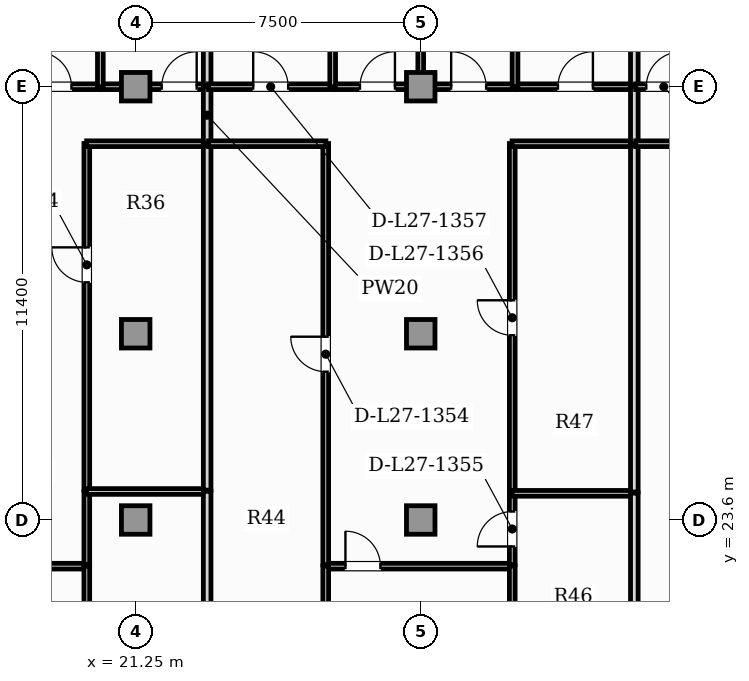
"""IFC4 building model, lengths in metres.
Left out: names, types, materials, properties, quantities, classifications, styles, units other than length and angle.
Written with IfcOpenShell. Run it as: python <this file> out.ifc"""

import sys

from ifc_helpers import new_model, si_unit, direction, frame, frame_2d, origin, origin_2d, place, context, subcontext, project, spatial, rectangle, extrude, element, fill, save


model = new_model("IFC4")
c1 = context("Model", 3, precision=1e-05, world=origin(), true_north=direction((0.0, 1.0)))
c2 = subcontext(c1, "Body", "Model", "MODEL_VIEW")
j1 = project(units=[si_unit("LENGTHUNIT", "METRE"), si_unit("PLANEANGLEUNIT", "RADIAN")], contexts=[c1])
p1 = place(None, origin())
s1 = spatial("IfcSite", under=j1, at=p1, CompositionType="ELEMENT")
p2 = place(p1, origin())
s2 = spatial("IfcBuilding", under=s1, at=p2, CompositionType="ELEMENT")
p3 = place(p2, frame((0.0, 0.0, 111.85)))
s3 = spatial("IfcBuildingStorey", under=s2, at=p3, CompositionType="ELEMENT", Elevation=111.85)
for number, where, z_axis, x_axis in (
    (1, (21.25, 23.6, 0.0), (0.0, 0.0, 1.0), (1.0, 0.0, 0.0)),
    (2, (28.75, 23.6, 0.0), (0.0, 0.0, 1.0), (1.0, 0.0, 0.0)),
    (3, (21.25, 28.5, 0.0), (0.0, 0.0, 1.0), (1.0, 0.0, 0.0)),
    (4, (28.75, 28.5, 0.0), (0.0, 0.0, 1.0), (1.0, 0.0, 0.0)),
    (5, (21.25, 35.0, 0.0), (0.0, 0.0, 1.0), (1.0, 0.0, 0.0)),
    (6, (28.75, 35.0, 0.0), (0.0, 0.0, 1.0), (1.0, 0.0, 0.0)),
):
    element("IfcColumn", number, at=place(p3, frame(where, z_axis=z_axis, x_axis=x_axis)), inside=s3, PredefinedType="COLUMN", context=c2, shape_type="SweptSolid", body=[
        extrude(rectangle(XDim=0.75, YDim=0.75, at=origin_2d()), origin(), (0.0, 0.0, 1.0), 3.85),
    ])
p4 = place(p3, frame((15.051, 22.385, 0.0), z_axis=(0.0, 0.0, 1.0), x_axis=(1.0, 0.0, 0.0)))
e7 = element("IfcWall", 7, at=p4, inside=s3, PredefinedType="PARTITIONING", context=c2, shape_type="SweptSolid", body=[
    extrude(rectangle(XDim=4.917, YDim=0.15, at=frame_2d((2.459, 0.0))), origin(), (0.0, 0.0, 1.0), 3.6),
])
p5 = place(p4, frame((1.999, 0.0, 0.0)))
e8 = element("IfcOpeningElement", 8, at=p5, cuts=e7, PredefinedType="OPENING", context=c2, shape_type="SweptSolid", body=[
    extrude(rectangle(XDim=0.92, YDim=2.1, at=frame_2d((0.46, 1.05))), frame((0.0, 0.085, 0.0), z_axis=(0.0, -1.0, 0.0), x_axis=(1.0, 0.0, 0.0)), (0.0, 0.0, 1.0), 0.17),
])
p6 = place(p3, frame((19.964, 17.2, 0.0), z_axis=(0.0, 0.0, 1.0), x_axis=(0.0, 1.0, 0.0)))
e9 = element("IfcWall", 9, at=p6, inside=s3, PredefinedType="PARTITIONING", context=c2, shape_type="SweptSolid", body=[
    extrude(rectangle(XDim=5.19, YDim=0.15, at=frame_2d((2.595, 0.0))), origin(), (0.0, 0.0, 1.0), 3.6),
])
p7 = place(p6, frame((2.135, 0.0, 0.0)))
e10 = element("IfcOpeningElement", 10, at=p7, cuts=e9, PredefinedType="OPENING", context=c2, shape_type="SweptSolid", body=[
    extrude(rectangle(XDim=0.92, YDim=2.1, at=frame_2d((0.46, 1.05))), frame((0.0, 0.085, 0.0), z_axis=(0.0, -1.0, 0.0), x_axis=(1.0, 0.0, 0.0)), (0.0, 0.0, 1.0), 0.17),
])
p8 = place(p3, frame((19.964, 22.419, 0.0), z_axis=(0.0, 0.0, 1.0), x_axis=(0.0, 1.0, 0.0)))
e11 = element("IfcWall", 11, at=p8, inside=s3, PredefinedType="PARTITIONING", context=c2, shape_type="SweptSolid", body=[
    extrude(rectangle(XDim=1.936, YDim=0.15, at=frame_2d((0.968, 0.0))), origin(), (0.0, 0.0, 1.0), 3.6),
])
p9 = place(p3, frame((19.964, 24.385, 0.0), z_axis=(0.0, 0.0, 1.0), x_axis=(0.0, 1.0, 0.0)))
e12 = element("IfcWall", 12, at=p9, inside=s3, PredefinedType="PARTITIONING", context=c2, shape_type="SweptSolid", body=[
    extrude(rectangle(XDim=9.12, YDim=0.15, at=frame_2d((4.56, 0.0))), origin(), (0.0, 0.0, 1.0), 3.6),
])
p10 = place(p9, frame((5.468, 0.0, 0.0)))
e13 = element("IfcOpeningElement", 13, at=p10, cuts=e12, PredefinedType="OPENING", context=c2, shape_type="SweptSolid", body=[
    extrude(rectangle(XDim=0.92, YDim=2.1, at=frame_2d((0.46, 1.05))), frame((0.0, 0.085, 0.0), z_axis=(0.0, -1.0, 0.0), x_axis=(1.0, 0.0, 0.0)), (0.0, 0.0, 1.0), 0.17),
])
p11 = place(p3, frame((19.959, 33.5, 0.0), z_axis=(0.0, 0.0, 1.0), x_axis=(1.0, 0.0, 0.0)))
e14 = element("IfcWall", 14, at=p11, inside=s3, PredefinedType="PARTITIONING", context=c2, shape_type="SweptSolid", body=[
    extrude(rectangle(XDim=3.176, YDim=0.15, at=frame_2d((1.588, 0.0))), origin(), (0.0, 0.0, 1.0), 3.6),
])
p12 = place(p3, frame((17.874, 35.0, 0.0), z_axis=(0.0, 0.0, 1.0), x_axis=(1.0, 0.0, 0.0)))
e15 = element("IfcWall", 15, at=p12, inside=s3, PredefinedType="PARTITIONING", context=c2, shape_type="SweptSolid", body=[
    extrude(rectangle(XDim=2.451, YDim=0.15, at=frame_2d((1.226, 0.0))), origin(), (0.0, 0.0, 1.0), 2.983),
])
p13 = place(p12, frame((0.766, 0.0, 0.0)))
e16 = element("IfcOpeningElement", 16, at=p13, cuts=e15, PredefinedType="OPENING", context=c2, shape_type="SweptSolid", body=[
    extrude(rectangle(XDim=0.92, YDim=2.1, at=frame_2d((0.46, 1.05))), frame((0.0, 0.085, 0.0), z_axis=(0.0, -1.0, 0.0), x_axis=(1.0, 0.0, 0.0)), (0.0, 0.0, 1.0), 0.17),
])
p14 = place(p3, frame((20.355, 35.0, 0.0), z_axis=(0.0, 0.0, 1.0), x_axis=(1.0, 0.0, 0.0)))
e17 = element("IfcWall", 17, at=p14, inside=s3, PredefinedType="PARTITIONING", context=c2, shape_type="SweptSolid", body=[
    extrude(rectangle(XDim=2.78, YDim=0.15, at=frame_2d((1.39, 0.0))), origin(), (0.0, 0.0, 1.0), 2.983),
])
p15 = place(p14, frame((1.58, 0.0, 0.0)))
e18 = element("IfcOpeningElement", 18, at=p15, cuts=e17, PredefinedType="OPENING", context=c2, shape_type="SweptSolid", body=[
    extrude(rectangle(XDim=0.92, YDim=2.1, at=frame_2d((0.46, 1.05))), frame((0.0, 0.085, 0.0), z_axis=(0.0, -1.0, 0.0), x_axis=(1.0, 0.0, 0.0)), (0.0, 0.0, 1.0), 0.17),
])
p16 = place(p3, frame((23.13, 33.495, 0.0), z_axis=(0.0, 0.0, 1.0), x_axis=(0.0, 1.0, 0.0)))
e19 = element("IfcWall", 19, at=p16, inside=s3, PredefinedType="PARTITIONING", context=c2, shape_type="SweptSolid", body=[
    extrude(rectangle(XDim=1.51, YDim=0.2, at=frame_2d((0.755, 0.0))), origin(), (0.0, 0.0, 1.0), 3.6),
])
p17 = place(p3, frame((19.959, 24.35, 0.0), z_axis=(0.0, 0.0, 1.0), x_axis=(1.0, 0.0, 0.0)))
e20 = element("IfcWall", 20, at=p17, inside=s3, PredefinedType="PARTITIONING", context=c2, shape_type="SweptSolid", body=[
    extrude(rectangle(XDim=3.176, YDim=0.15, at=frame_2d((1.588, 0.0))), origin(), (0.0, 0.0, 1.0), 3.6),
])
p18 = place(p3, frame((23.13, 17.2, 0.0), z_axis=(0.0, 0.0, 1.0), x_axis=(0.0, 1.0, 0.0)))
e21 = element("IfcWall", 21, at=p18, inside=s3, PredefinedType="PARTITIONING", context=c2, shape_type="SweptSolid", body=[
    extrude(rectangle(XDim=7.155, YDim=0.2, at=frame_2d((3.578, 0.0))), origin(), (0.0, 0.0, 1.0), 3.6),
])
p19 = place(p3, frame((23.13, 24.385, 0.0), z_axis=(0.0, 0.0, 1.0), x_axis=(0.0, 1.0, 0.0)))
e22 = element("IfcWall", 22, at=p19, inside=s3, PredefinedType="PARTITIONING", context=c2, shape_type="SweptSolid", body=[
    extrude(rectangle(XDim=9.08, YDim=0.2, at=frame_2d((4.54, 0.0))), origin(), (0.0, 0.0, 1.0), 3.6),
])
p20 = place(p3, frame((20.32, 34.995, 0.0), z_axis=(0.0, 0.0, 1.0), x_axis=(0.0, 1.0, 0.0)))
e23 = element("IfcWall", 23, at=p20, inside=s3, PredefinedType="PARTITIONING", context=c2, shape_type="SweptSolid", body=[
    extrude(rectangle(XDim=7.995, YDim=0.15, at=frame_2d((3.998, 0.0))), origin(), (0.0, 0.0, 1.0), 3.6),
])
p21 = place(p3, frame((23.13, 35.035, 0.0), z_axis=(0.0, 0.0, 1.0), x_axis=(0.0, 1.0, 0.0)))
e24 = element("IfcWall", 24, at=p21, inside=s3, PredefinedType="PARTITIONING", context=c2, shape_type="SweptSolid", body=[
    extrude(rectangle(XDim=7.955, YDim=0.2, at=frame_2d((3.978, 0.0))), origin(), (0.0, 0.0, 1.0), 3.6),
])
p22 = place(p3, frame((26.245, 22.385, 0.0), z_axis=(0.0, 0.0, 1.0), x_axis=(1.0, 0.0, 0.0)))
e25 = element("IfcWall", 25, at=p22, inside=s3, PredefinedType="PARTITIONING", context=c2, shape_type="SweptSolid", body=[
    extrude(rectangle(XDim=4.918, YDim=0.15, at=frame_2d((2.459, 0.0))), origin(), (0.0, 0.0, 1.0), 3.6),
])
p23 = place(p22, frame((0.523, 0.0, 0.0)))
e26 = element("IfcOpeningElement", 26, at=p23, cuts=e25, PredefinedType="OPENING", context=c2, shape_type="SweptSolid", body=[
    extrude(rectangle(XDim=0.92, YDim=2.1, at=frame_2d((0.46, 1.05))), frame((0.0, 0.085, 0.0), z_axis=(0.0, -1.0, 0.0), x_axis=(1.0, 0.0, 0.0)), (0.0, 0.0, 1.0), 0.17),
])
p24 = place(p3, frame((26.25, 16.23, 0.0), z_axis=(0.0, 0.0, 1.0), x_axis=(0.0, 1.0, 0.0)))
e27 = element("IfcWall", 27, at=p24, inside=s3, PredefinedType="PARTITIONING", context=c2, shape_type="SweptSolid", body=[
    extrude(rectangle(XDim=6.16, YDim=0.15, at=frame_2d((3.08, 0.0))), origin(), (0.0, 0.0, 1.0), 3.6),
])
p25 = place(p24, frame((2.62, 0.0, 0.0)))
e28 = element("IfcOpeningElement", 28, at=p25, cuts=e27, PredefinedType="OPENING", context=c2, shape_type="SweptSolid", body=[
    extrude(rectangle(XDim=0.92, YDim=2.1, at=frame_2d((0.46, 1.05))), frame((0.0, 0.085, 0.0), z_axis=(0.0, -1.0, 0.0), x_axis=(1.0, 0.0, 0.0)), (0.0, 0.0, 1.0), 0.17),
])
p26 = place(p3, frame((31.158, 17.151, 0.0), z_axis=(0.0, 0.0, 1.0), x_axis=(0.0, 1.0, 0.0)))
e29 = element("IfcWall", 29, at=p26, inside=s3, PredefinedType="PARTITIONING", context=c2, shape_type="SweptSolid", body=[
    extrude(rectangle(XDim=5.239, YDim=0.15, at=frame_2d((2.619, 0.0))), origin(), (0.0, 0.0, 1.0), 3.6),
])
p27 = place(p26, frame((2.159, 0.0, 0.0)))
e30 = element("IfcOpeningElement", 30, at=p27, cuts=e29, PredefinedType="OPENING", context=c2, shape_type="SweptSolid", body=[
    extrude(rectangle(XDim=0.92, YDim=2.1, at=frame_2d((0.46, 1.05))), frame((0.0, 0.085, 0.0), z_axis=(0.0, -1.0, 0.0), x_axis=(1.0, 0.0, 0.0)), (0.0, 0.0, 1.0), 0.17),
])
p28 = place(p3, frame((26.25, 22.419, 0.0), z_axis=(0.0, 0.0, 1.0), x_axis=(0.0, 1.0, 0.0)))
e31 = element("IfcWall", 31, at=p28, inside=s3, PredefinedType="PARTITIONING", context=c2, shape_type="SweptSolid", body=[
    extrude(rectangle(XDim=11.085, YDim=0.15, at=frame_2d((5.543, 0.0))), origin(), (0.0, 0.0, 1.0), 3.6),
])
p29 = place(p28, frame((5.083, 0.0, 0.0)))
e32 = element("IfcOpeningElement", 32, at=p29, cuts=e31, PredefinedType="OPENING", context=c2, shape_type="SweptSolid", body=[
    extrude(rectangle(XDim=0.92, YDim=2.1, at=frame_2d((0.46, 1.05))), frame((0.0, 0.085, 0.0), z_axis=(0.0, -1.0, 0.0), x_axis=(1.0, 0.0, 0.0)), (0.0, 0.0, 1.0), 0.17),
])
p30 = place(p3, frame((23.165, 33.5, 0.0), z_axis=(0.0, 0.0, 1.0), x_axis=(1.0, 0.0, 0.0)))
e33 = element("IfcWall", 33, at=p30, inside=s3, PredefinedType="PARTITIONING", context=c2, shape_type="SweptSolid", body=[
    extrude(rectangle(XDim=3.09, YDim=0.15, at=frame_2d((1.545, 0.0))), origin(), (0.0, 0.0, 1.0), 3.6),
])
p31 = place(p3, frame((31.158, 22.419, 0.0), z_axis=(0.0, 0.0, 1.0), x_axis=(0.0, 1.0, 0.0)))
e34 = element("IfcWall", 34, at=p31, inside=s3, PredefinedType="PARTITIONING", context=c2, shape_type="SweptSolid", body=[
    extrude(rectangle(XDim=1.887, YDim=0.15, at=frame_2d((0.943, 0.0))), origin(), (0.0, 0.0, 1.0), 3.6),
])
p32 = place(p31, frame((0.483, 0.0, 0.0)))
e35 = element("IfcOpeningElement", 35, at=p32, cuts=e34, PredefinedType="OPENING", context=c2, shape_type="SweptSolid", body=[
    extrude(rectangle(XDim=0.92, YDim=2.1, at=frame_2d((0.46, 1.05))), frame((0.0, 0.085, 0.0), z_axis=(0.0, -1.0, 0.0), x_axis=(1.0, 0.0, 0.0)), (0.0, 0.0, 1.0), 0.17),
])
p33 = place(p3, frame((31.158, 24.336, 0.0), z_axis=(0.0, 0.0, 1.0), x_axis=(0.0, 1.0, 0.0)))
e36 = element("IfcWall", 36, at=p33, inside=s3, PredefinedType="PARTITIONING", context=c2, shape_type="SweptSolid", body=[
    extrude(rectangle(XDim=9.169, YDim=0.15, at=frame_2d((4.584, 0.0))), origin(), (0.0, 0.0, 1.0), 3.6),
])
p34 = place(p33, frame((4.125, 0.0, 0.0)))
e37 = element("IfcOpeningElement", 37, at=p34, cuts=e36, PredefinedType="OPENING", context=c2, shape_type="SweptSolid", body=[
    extrude(rectangle(XDim=0.92, YDim=2.1, at=frame_2d((0.46, 1.05))), frame((0.0, 0.085, 0.0), z_axis=(0.0, -1.0, 0.0), x_axis=(1.0, 0.0, 0.0)), (0.0, 0.0, 1.0), 0.17),
])
p35 = place(p3, frame((31.153, 33.5, 0.0), z_axis=(0.0, 0.0, 1.0), x_axis=(1.0, 0.0, 0.0)))
e38 = element("IfcWall", 38, at=p35, inside=s3, PredefinedType="PARTITIONING", context=c2, shape_type="SweptSolid", body=[
    extrude(rectangle(XDim=3.222, YDim=0.15, at=frame_2d((1.611, 0.0))), origin(), (0.0, 0.0, 1.0), 3.6),
])
p36 = place(p3, frame((23.165, 35.0, 0.0), z_axis=(0.0, 0.0, 1.0), x_axis=(1.0, 0.0, 0.0)))
e39 = element("IfcWall", 39, at=p36, inside=s3, PredefinedType="PARTITIONING", context=c2, shape_type="SweptSolid", body=[
    extrude(rectangle(XDim=3.273, YDim=0.15, at=frame_2d((1.636, 0.0))), origin(), (0.0, 0.0, 1.0), 2.983),
])
p37 = place(p36, frame((1.177, 0.0, 0.0)))
e40 = element("IfcOpeningElement", 40, at=p37, cuts=e39, PredefinedType="OPENING", context=c2, shape_type="SweptSolid", body=[
    extrude(rectangle(XDim=0.92, YDim=2.1, at=frame_2d((0.46, 1.05))), frame((0.0, 0.085, 0.0), z_axis=(0.0, -1.0, 0.0), x_axis=(1.0, 0.0, 0.0)), (0.0, 0.0, 1.0), 0.17),
])
p38 = place(p3, frame((26.468, 35.0, 0.0), z_axis=(0.0, 0.0, 1.0), x_axis=(1.0, 0.0, 0.0)))
e41 = element("IfcWall", 41, at=p38, inside=s3, PredefinedType="PARTITIONING", context=c2, shape_type="SweptSolid", body=[
    extrude(rectangle(XDim=2.287, YDim=0.15, at=frame_2d((1.144, 0.0))), origin(), (0.0, 0.0, 1.0), 2.983),
])
p39 = place(p38, frame((0.683, 0.0, 0.0)))
e42 = element("IfcOpeningElement", 42, at=p39, cuts=e41, PredefinedType="OPENING", context=c2, shape_type="SweptSolid", body=[
    extrude(rectangle(XDim=0.92, YDim=2.1, at=frame_2d((0.46, 1.05))), frame((0.0, 0.085, 0.0), z_axis=(0.0, -1.0, 0.0), x_axis=(1.0, 0.0, 0.0)), (0.0, 0.0, 1.0), 0.17),
])
p40 = place(p3, frame((28.785, 35.0, 0.0), z_axis=(0.0, 0.0, 1.0), x_axis=(1.0, 0.0, 0.0)))
e43 = element("IfcWall", 43, at=p40, inside=s3, PredefinedType="PARTITIONING", context=c2, shape_type="SweptSolid", body=[
    extrude(rectangle(XDim=2.451, YDim=0.15, at=frame_2d((1.226, 0.0))), origin(), (0.0, 0.0, 1.0), 2.983),
])
p41 = place(p40, frame((0.766, 0.0, 0.0)))
e44 = element("IfcOpeningElement", 44, at=p41, cuts=e43, PredefinedType="OPENING", context=c2, shape_type="SweptSolid", body=[
    extrude(rectangle(XDim=0.92, YDim=2.1, at=frame_2d((0.46, 1.05))), frame((0.0, 0.085, 0.0), z_axis=(0.0, -1.0, 0.0), x_axis=(1.0, 0.0, 0.0)), (0.0, 0.0, 1.0), 0.17),
])
p42 = place(p3, frame((31.266, 35.0, 0.0), z_axis=(0.0, 0.0, 1.0), x_axis=(1.0, 0.0, 0.0)))
e45 = element("IfcWall", 45, at=p42, inside=s3, PredefinedType="PARTITIONING", context=c2, shape_type="SweptSolid", body=[
    extrude(rectangle(XDim=3.109, YDim=0.15, at=frame_2d((1.554, 0.0))), origin(), (0.0, 0.0, 1.0), 2.983),
])
p43 = place(p42, frame((1.094, 0.0, 0.0)))
e46 = element("IfcOpeningElement", 46, at=p43, cuts=e45, PredefinedType="OPENING", context=c2, shape_type="SweptSolid", body=[
    extrude(rectangle(XDim=0.92, YDim=2.1, at=frame_2d((0.46, 1.05))), frame((0.0, 0.085, 0.0), z_axis=(0.0, -1.0, 0.0), x_axis=(1.0, 0.0, 0.0)), (0.0, 0.0, 1.0), 0.17),
])
p44 = place(p3, frame((34.37, 33.495, 0.0), z_axis=(0.0, 0.0, 1.0), x_axis=(0.0, 1.0, 0.0)))
e47 = element("IfcWall", 47, at=p44, inside=s3, PredefinedType="PARTITIONING", context=c2, shape_type="SweptSolid", body=[
    extrude(rectangle(XDim=1.51, YDim=0.2, at=frame_2d((0.755, 0.0))), origin(), (0.0, 0.0, 1.0), 3.6),
])
p45 = place(p3, frame((31.153, 24.301, 0.0), z_axis=(0.0, 0.0, 1.0), x_axis=(1.0, 0.0, 0.0)))
e48 = element("IfcWall", 48, at=p45, inside=s3, PredefinedType="PARTITIONING", context=c2, shape_type="SweptSolid", body=[
    extrude(rectangle(XDim=3.222, YDim=0.15, at=frame_2d((1.611, 0.0))), origin(), (0.0, 0.0, 1.0), 3.6),
])
p46 = place(p3, frame((34.37, 17.151, 0.0), z_axis=(0.0, 0.0, 1.0), x_axis=(0.0, 1.0, 0.0)))
e49 = element("IfcWall", 49, at=p46, inside=s3, PredefinedType="PARTITIONING", context=c2, shape_type="SweptSolid", body=[
    extrude(rectangle(XDim=7.155, YDim=0.2, at=frame_2d((3.578, 0.0))), origin(), (0.0, 0.0, 1.0), 3.6),
])
p47 = place(p3, frame((34.37, 24.336, 0.0), z_axis=(0.0, 0.0, 1.0), x_axis=(0.0, 1.0, 0.0)))
e50 = element("IfcWall", 50, at=p47, inside=s3, PredefinedType="PARTITIONING", context=c2, shape_type="SweptSolid", body=[
    extrude(rectangle(XDim=9.129, YDim=0.2, at=frame_2d((4.564, 0.0))), origin(), (0.0, 0.0, 1.0), 3.6),
])
for number, where, z_axis, x_axis in (
    (51, (26.433, 34.995, 0.0), (0.0, 0.0, 1.0), (0.0, 1.0, 0.0)),
    (52, (28.75, 34.995, 0.0), (0.0, 0.0, 1.0), (0.0, 1.0, 0.0)),
    (53, (31.231, 34.995, 0.0), (0.0, 0.0, 1.0), (0.0, 1.0, 0.0)),
):
    element("IfcWall", number, at=place(p3, frame(where, z_axis=z_axis, x_axis=x_axis)), inside=s3, PredefinedType="PARTITIONING", context=c2, shape_type="SweptSolid", body=[
        extrude(rectangle(XDim=7.995, YDim=0.15, at=frame_2d((3.998, 0.0))), origin(), (0.0, 0.0, 1.0), 3.6),
    ])
p48 = place(p3, frame((34.37, 35.035, 0.0), z_axis=(0.0, 0.0, 1.0), x_axis=(0.0, 1.0, 0.0)))
e54 = element("IfcWall", 54, at=p48, inside=s3, PredefinedType="PARTITIONING", context=c2, shape_type="SweptSolid", body=[
    extrude(rectangle(XDim=7.955, YDim=0.2, at=frame_2d((3.978, 0.0))), origin(), (0.0, 0.0, 1.0), 3.6),
])
p49 = place(p3, frame((34.405, 33.5, 0.0), z_axis=(0.0, 0.0, 1.0), x_axis=(1.0, 0.0, 0.0)))
e55 = element("IfcWall", 55, at=p49, inside=s3, PredefinedType="PARTITIONING", context=c2, shape_type="SweptSolid", body=[
    extrude(rectangle(XDim=3.159, YDim=0.15, at=frame_2d((1.58, 0.0))), origin(), (0.0, 0.0, 1.0), 3.6),
])
p50 = place(p3, frame((34.405, 35.0, 0.0), z_axis=(0.0, 0.0, 1.0), x_axis=(1.0, 0.0, 0.0)))
e56 = element("IfcWall", 56, at=p50, inside=s3, PredefinedType="PARTITIONING", context=c2, shape_type="SweptSolid", body=[
    extrude(rectangle(XDim=3.273, YDim=0.15, at=frame_2d((1.636, 0.0))), origin(), (0.0, 0.0, 1.0), 2.983),
])
p51 = place(p50, frame((0.28, 0.0, 0.0)))
e57 = element("IfcOpeningElement", 57, at=p51, cuts=e56, PredefinedType="OPENING", context=c2, shape_type="SweptSolid", body=[
    extrude(rectangle(XDim=0.92, YDim=2.1, at=frame_2d((0.46, 1.05))), frame((0.0, 0.085, 0.0), z_axis=(0.0, -1.0, 0.0), x_axis=(1.0, 0.0, 0.0)), (0.0, 0.0, 1.0), 0.17),
])
p52 = place(p10, origin())
e58 = element("IfcDoor", 58, at=p52, inside=s3, OperationType="SINGLE_SWING_RIGHT", PredefinedType="DOOR", context=c2, shape_type="SweptSolid", body=[
    extrude(rectangle(XDim=0.92, YDim=2.1, at=frame_2d((0.46, 1.05))), frame((0.0, 0.025, 0.0), z_axis=(0.0, -1.0, 0.0), x_axis=(1.0, 0.0, 0.0)), (0.0, 0.0, 1.0), 0.05),
])
fill(e13, e58)
p53 = place(p13, origin())
e59 = element("IfcDoor", 59, at=p53, inside=s3, OperationType="SINGLE_SWING_LEFT", PredefinedType="DOOR", context=c2, shape_type="SweptSolid", body=[
    extrude(rectangle(XDim=0.92, YDim=2.1, at=frame_2d((0.46, 1.05))), frame((0.0, 0.025, 0.0), z_axis=(0.0, -1.0, 0.0), x_axis=(1.0, 0.0, 0.0)), (0.0, 0.0, 1.0), 0.05),
])
fill(e16, e59)
p54 = place(p15, origin())
e60 = element("IfcDoor", 60, at=p54, inside=s3, OperationType="SINGLE_SWING_RIGHT", PredefinedType="DOOR", context=c2, shape_type="SweptSolid", body=[
    extrude(rectangle(XDim=0.92, YDim=2.1, at=frame_2d((0.46, 1.05))), frame((0.0, 0.025, 0.0), z_axis=(0.0, -1.0, 0.0), x_axis=(1.0, 0.0, 0.0)), (0.0, 0.0, 1.0), 0.05),
])
fill(e18, e60)
p55 = place(p23, origin())
e61 = element("IfcDoor", 61, at=p55, inside=s3, OperationType="SINGLE_SWING_LEFT", PredefinedType="DOOR", context=c2, shape_type="SweptSolid", body=[
    extrude(rectangle(XDim=0.92, YDim=2.1, at=frame_2d((0.46, 1.05))), frame((0.0, 0.025, 0.0), z_axis=(0.0, -1.0, 0.0), x_axis=(1.0, 0.0, 0.0)), (0.0, 0.0, 1.0), 0.05),
])
fill(e26, e61)
p56 = place(p29, origin())
e62 = element("IfcDoor", 62, at=p56, inside=s3, OperationType="SINGLE_SWING_RIGHT", PredefinedType="DOOR", context=c2, shape_type="SweptSolid", body=[
    extrude(rectangle(XDim=0.92, YDim=2.1, at=frame_2d((0.46, 1.05))), frame((0.0, 0.025, 0.0), z_axis=(0.0, -1.0, 0.0), x_axis=(1.0, 0.0, 0.0)), (0.0, 0.0, 1.0), 0.05),
])
fill(e32, e62)
p57 = place(p32, origin())
e63 = element("IfcDoor", 63, at=p57, inside=s3, OperationType="SINGLE_SWING_LEFT", PredefinedType="DOOR", context=c2, shape_type="SweptSolid", body=[
    extrude(rectangle(XDim=0.92, YDim=2.1, at=frame_2d((0.46, 1.05))), frame((0.0, 0.025, 0.0), z_axis=(0.0, -1.0, 0.0), x_axis=(1.0, 0.0, 0.0)), (0.0, 0.0, 1.0), 0.05),
])
fill(e35, e63)
p58 = place(p34, origin())
e64 = element("IfcDoor", 64, at=p58, inside=s3, OperationType="SINGLE_SWING_RIGHT", PredefinedType="DOOR", context=c2, shape_type="SweptSolid", body=[
    extrude(rectangle(XDim=0.92, YDim=2.1, at=frame_2d((0.46, 1.05))), frame((0.0, 0.025, 0.0), z_axis=(0.0, -1.0, 0.0), x_axis=(1.0, 0.0, 0.0)), (0.0, 0.0, 1.0), 0.05),
])
fill(e37, e64)
p59 = place(p37, origin())
e65 = element("IfcDoor", 65, at=p59, inside=s3, OperationType="SINGLE_SWING_LEFT", PredefinedType="DOOR", context=c2, shape_type="SweptSolid", body=[
    extrude(rectangle(XDim=0.92, YDim=2.1, at=frame_2d((0.46, 1.05))), frame((0.0, 0.025, 0.0), z_axis=(0.0, -1.0, 0.0), x_axis=(1.0, 0.0, 0.0)), (0.0, 0.0, 1.0), 0.05),
])
fill(e40, e65)
p60 = place(p39, origin())
e66 = element("IfcDoor", 66, at=p60, inside=s3, OperationType="SINGLE_SWING_RIGHT", PredefinedType="DOOR", context=c2, shape_type="SweptSolid", body=[
    extrude(rectangle(XDim=0.92, YDim=2.1, at=frame_2d((0.46, 1.05))), frame((0.0, 0.025, 0.0), z_axis=(0.0, -1.0, 0.0), x_axis=(1.0, 0.0, 0.0)), (0.0, 0.0, 1.0), 0.05),
])
fill(e42, e66)
p61 = place(p41, origin())
e67 = element("IfcDoor", 67, at=p61, inside=s3, OperationType="SINGLE_SWING_LEFT", PredefinedType="DOOR", context=c2, shape_type="SweptSolid", body=[
    extrude(rectangle(XDim=0.92, YDim=2.1, at=frame_2d((0.46, 1.05))), frame((0.0, 0.025, 0.0), z_axis=(0.0, -1.0, 0.0), x_axis=(1.0, 0.0, 0.0)), (0.0, 0.0, 1.0), 0.05),
])
fill(e44, e67)
p62 = place(p43, origin())
e68 = element("IfcDoor", 68, at=p62, inside=s3, OperationType="SINGLE_SWING_RIGHT", PredefinedType="DOOR", context=c2, shape_type="SweptSolid", body=[
    extrude(rectangle(XDim=0.92, YDim=2.1, at=frame_2d((0.46, 1.05))), frame((0.0, 0.025, 0.0), z_axis=(0.0, -1.0, 0.0), x_axis=(1.0, 0.0, 0.0)), (0.0, 0.0, 1.0), 0.05),
])
fill(e46, e68)
p63 = place(p51, origin())
e69 = element("IfcDoor", 69, at=p63, inside=s3, OperationType="SINGLE_SWING_RIGHT", PredefinedType="DOOR", context=c2, shape_type="SweptSolid", body=[
    extrude(rectangle(XDim=0.92, YDim=2.1, at=frame_2d((0.46, 1.05))), frame((0.0, 0.025, 0.0), z_axis=(0.0, -1.0, 0.0), x_axis=(1.0, 0.0, 0.0)), (0.0, 0.0, 1.0), 0.05),
])
fill(e57, e69)
save(model, sys.argv[1])
